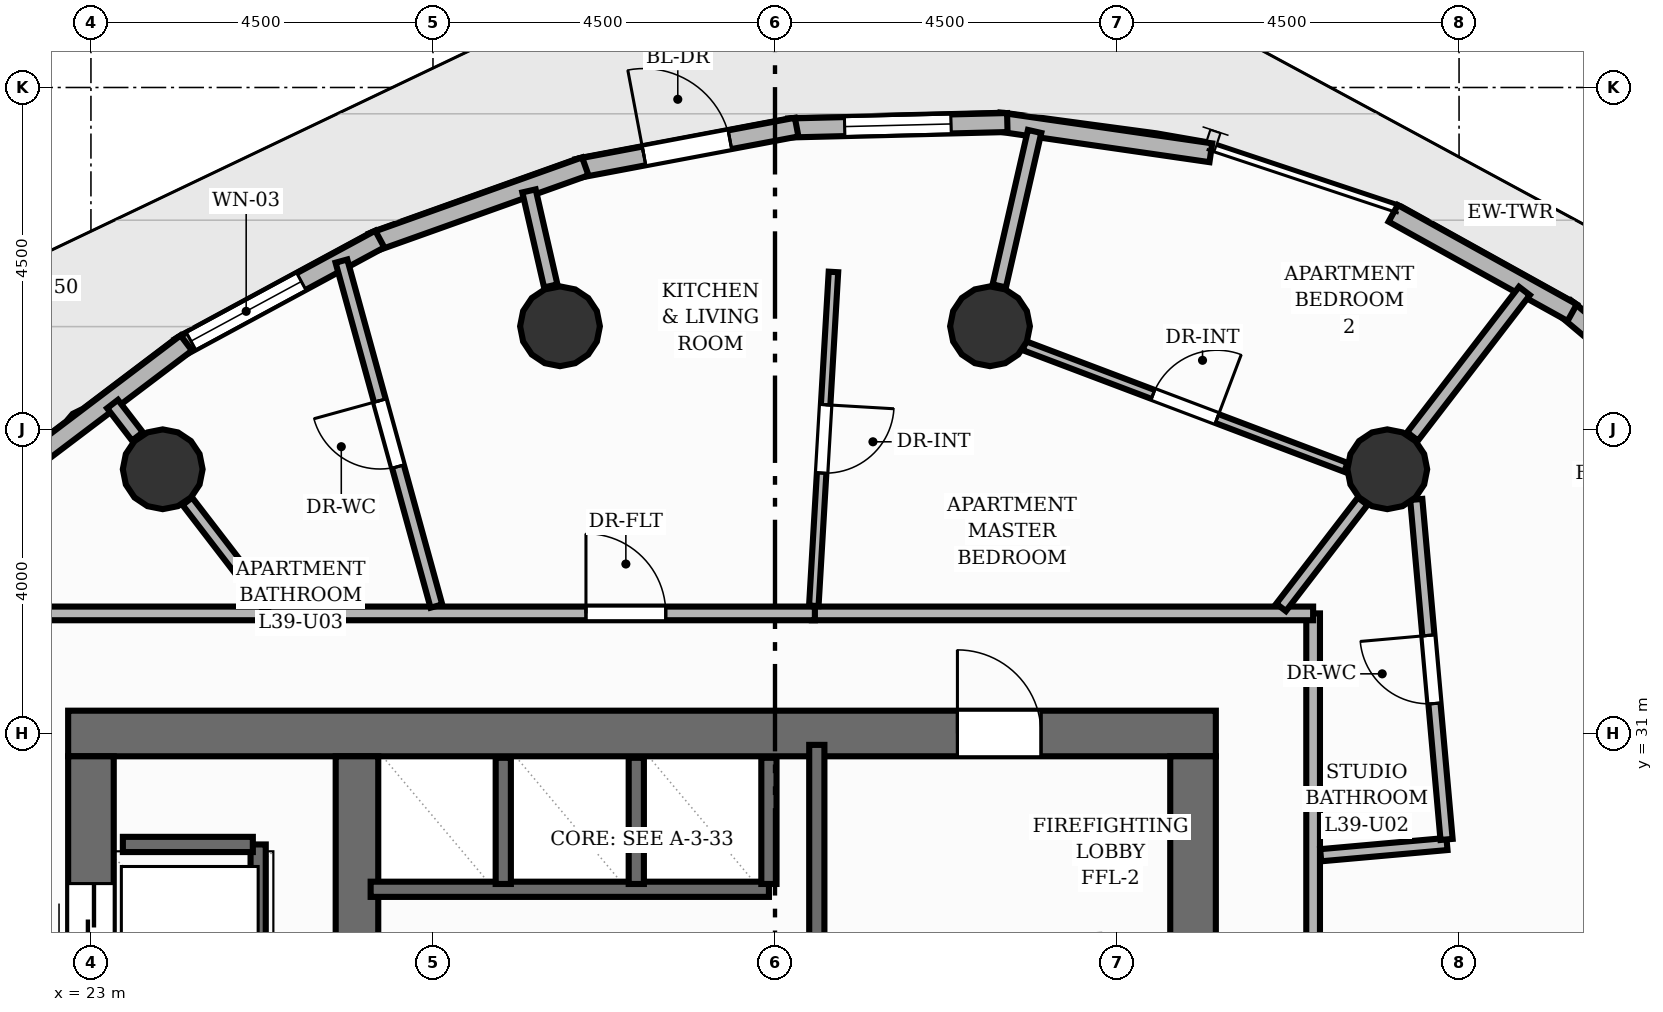
"""IFC4 building model, lengths in metres.
Left out: names, types, materials, properties, quantities, classifications, styles, units other than length and angle.
Written with IfcOpenShell. Run it as: python <this file> out.ifc"""

import sys

from ifc_helpers import new_model, si_unit, direction, frame, frame_2d, origin, origin_2d, place, context, subcontext, project, spatial, rectangle, circle, extrude, element, fill, save


model = new_model("IFC4")
c1 = context("Model", 3, precision=1e-05, world=origin(), true_north=direction((0.0, 1.0)))
c2 = subcontext(c1, "Body", "Model", "MODEL_VIEW")
j1 = project(units=[si_unit("LENGTHUNIT", "METRE"), si_unit("PLANEANGLEUNIT", "RADIAN")], contexts=[c1])
p1 = place(None, origin())
s1 = spatial("IfcSite", under=j1, at=p1, CompositionType="ELEMENT")
p2 = place(p1, origin())
s2 = spatial("IfcBuilding", under=s1, at=p2, CompositionType="ELEMENT")
p3 = place(p2, frame((0.0, 0.0, 132.96)))
s3 = spatial("IfcBuildingStorey", under=s2, at=p3, CompositionType="ELEMENT", Elevation=132.96)
p4 = place(p3, frame((22.7, 31.0, 0.0), z_axis=(0.0, 0.0, 1.0), x_axis=(1.0, 0.0, 0.0)))
e1 = element("IfcWall", 1, at=p4, inside=s3, PredefinedType="SHEAR", context=c2, shape_type="SweptSolid", body=[
    extrude(rectangle(XDim=15.1, YDim=0.6, at=frame_2d((7.55, 0.0))), origin(), (0.0, 0.0, 1.0), 3.2),
])
p5 = place(p4, frame((11.7, 0.0, 0.0)))
e2 = element("IfcOpeningElement", 2, at=p5, cuts=e1, PredefinedType="OPENING", context=c2, shape_type="SweptSolid", body=[
    extrude(rectangle(XDim=1.1, YDim=2.15, at=frame_2d((0.55, 1.075))), frame((0.0, 0.31, 0.0), z_axis=(0.0, -1.0, 0.0), x_axis=(1.0, 0.0, 0.0)), (0.0, 0.0, 1.0), 0.62),
])
p6 = place(p3, frame((23.0, 17.3, 0.0), z_axis=(0.0, 0.0, 1.0), x_axis=(0.0, 1.0, 0.0)))
e3 = element("IfcWall", 3, at=p6, inside=s3, PredefinedType="SHEAR", context=c2, shape_type="SweptSolid", body=[
    extrude(rectangle(XDim=13.4, YDim=0.6, at=frame_2d((6.7, 0.0))), origin(), (0.0, 0.0, 1.0), 3.2),
])
p7 = place(p6, frame((1.675, 0.0, 0.0)))
e4 = element("IfcOpeningElement", 4, at=p7, cuts=e3, PredefinedType="OPENING", context=c2, shape_type="SweptSolid", body=[
    extrude(rectangle(XDim=1.05, YDim=2.15, at=frame_2d((0.525, 1.075))), frame((0.0, 0.31, 0.0), z_axis=(0.0, -1.0, 0.0), x_axis=(1.0, 0.0, 0.0)), (0.0, 0.0, 1.0), 0.62),
])
p8 = place(p6, frame((6.175, 0.0, 0.0)))
e5 = element("IfcOpeningElement", 5, at=p8, cuts=e3, PredefinedType="OPENING", context=c2, shape_type="SweptSolid", body=[
    extrude(rectangle(XDim=1.05, YDim=2.15, at=frame_2d((0.525, 1.075))), frame((0.0, 0.31, 0.0), z_axis=(0.0, -1.0, 0.0), x_axis=(1.0, 0.0, 0.0)), (0.0, 0.0, 1.0), 0.62),
])
p9 = place(p6, frame((10.675, 0.0, 0.0)))
e6 = element("IfcOpeningElement", 6, at=p9, cuts=e3, PredefinedType="OPENING", context=c2, shape_type="SweptSolid", body=[
    extrude(rectangle(XDim=1.05, YDim=2.15, at=frame_2d((0.525, 1.075))), frame((0.0, 0.31, 0.0), z_axis=(0.0, -1.0, 0.0), x_axis=(1.0, 0.0, 0.0)), (0.0, 0.0, 1.0), 0.62),
])
p10 = place(p3, frame((37.5, 17.3, 0.0), z_axis=(0.0, 0.0, 1.0), x_axis=(0.0, 1.0, 0.0)))
e7 = element("IfcWall", 7, at=p10, inside=s3, PredefinedType="SHEAR", context=c2, shape_type="SweptSolid", body=[
    extrude(rectangle(XDim=13.4, YDim=0.6, at=frame_2d((6.7, 0.0))), origin(), (0.0, 0.0, 1.0), 3.2),
])
p11 = place(p3, frame((26.5, 17.3, 0.0), z_axis=(0.0, 0.0, 1.0), x_axis=(0.0, 1.0, 0.0)))
e8 = element("IfcWall", 8, at=p11, inside=s3, PredefinedType="SHEAR", context=c2, shape_type="SweptSolid", body=[
    extrude(rectangle(XDim=13.4, YDim=0.56, at=frame_2d((6.7, 0.0))), origin(), (0.0, 0.0, 1.0), 3.2),
])
for number, where, z_axis, x_axis in (
    (9, (40.056, 34.477, 0.0), (0.0, 0.0, 1.0), (1.0, 0.0, 0.0)),
    (10, (34.829, 36.358, 0.0), (0.0, 0.0, 1.0), (1.0, 0.0, 0.0)),
    (11, (29.171, 36.358, 0.0), (0.0, 0.0, 1.0), (1.0, 0.0, 0.0)),
    (12, (23.944, 34.477, 0.0), (0.0, 0.0, 1.0), (1.0, 0.0, 0.0)),
):
    element("IfcColumn", number, at=place(p3, frame(where, z_axis=z_axis, x_axis=x_axis)), inside=s3, PredefinedType="COLUMN", context=c2, shape_type="SweptSolid", body=[
        extrude(circle(Radius=0.525, at=origin_2d()), origin(), (0.0, 0.0, 1.0), 3.2),
    ])
p12 = place(p3, frame((42.395, 36.601, 0.0), z_axis=(0.0, 0.0, 1.0), x_axis=(0.764825125467, -0.644237943197, 0.0)))
e13 = element("IfcWall", 13, at=p12, inside=s3, PredefinedType="SOLIDWALL", context=c2, shape_type="SweptSolid", body=[
    extrude(rectangle(XDim=2.648, YDim=0.25, at=frame_2d((1.324, 0.0))), origin(), (0.0, 0.0, 1.0), 2.96),
])
p13 = place(p12, frame((0.624, 0.0, 0.85)))
e14 = element("IfcOpeningElement", 14, at=p13, cuts=e13, PredefinedType="OPENING", context=c2, shape_type="SweptSolid", body=[
    extrude(rectangle(XDim=1.4, YDim=1.55, at=frame_2d((0.7, 0.775))), frame((0.0, 0.135, 0.0), z_axis=(0.0, -1.0, 0.0), x_axis=(1.0, 0.0, 0.0)), (0.0, 0.0, 1.0), 0.27),
])
p14 = place(p3, frame((40.134, 37.844, 0.0), z_axis=(0.0, 0.0, 1.0), x_axis=(0.874341102682, -0.485311895755, 0.0)))
e15 = element("IfcWall", 15, at=p14, inside=s3, PredefinedType="SOLIDWALL", context=c2, shape_type="SweptSolid", body=[
    extrude(rectangle(XDim=2.693, YDim=0.25, at=frame_2d((1.346, 0.0))), origin(), (0.0, 0.0, 1.0), 2.96),
])
p15 = place(p3, frame((34.946, 39.045, 0.0), z_axis=(0.0, 0.0, 1.0), x_axis=(0.98966505468, -0.143398324768, 0.0)))
e16 = element("IfcWall", 16, at=p15, inside=s3, PredefinedType="SOLIDWALL", context=c2, shape_type="SweptSolid", body=[
    extrude(rectangle(XDim=2.818, YDim=0.25, at=frame_2d((1.409, 0.0))), origin(), (0.0, 0.0, 1.0), 2.96),
])
p16 = place(p3, frame((32.176, 38.967, 0.0), z_axis=(0.0, 0.0, 1.0), x_axis=(0.999687646408, 0.02499219116, 0.0)))
e17 = element("IfcWall", 17, at=p16, inside=s3, PredefinedType="SOLIDWALL", context=c2, shape_type="SweptSolid", body=[
    extrude(rectangle(XDim=2.882, YDim=0.25, at=frame_2d((1.441, 0.0))), origin(), (0.0, 0.0, 1.0), 2.96),
])
p17 = place(p16, frame((0.741, 0.0, 0.85)))
e18 = element("IfcOpeningElement", 18, at=p17, cuts=e17, PredefinedType="OPENING", context=c2, shape_type="SweptSolid", body=[
    extrude(rectangle(XDim=1.4, YDim=1.55, at=frame_2d((0.7, 0.775))), frame((0.0, 0.135, 0.0), z_axis=(0.0, -1.0, 0.0), x_axis=(1.0, 0.0, 0.0)), (0.0, 0.0, 1.0), 0.27),
])
p18 = place(p3, frame((29.399, 38.434, 0.0), z_axis=(0.0, 0.0, 1.0), x_axis=(0.982637070109, 0.185538105108, 0.0)))
e19 = element("IfcWall", 19, at=p18, inside=s3, PredefinedType="SOLIDWALL", context=c2, shape_type="SweptSolid", body=[
    extrude(rectangle(XDim=2.937, YDim=0.25, at=frame_2d((1.469, 0.0))), origin(), (0.0, 0.0, 1.0), 2.96),
])
p19 = place(p18, frame((0.893, 0.0, 0.0)))
e20 = element("IfcOpeningElement", 20, at=p19, cuts=e19, PredefinedType="OPENING", context=c2, shape_type="SweptSolid", body=[
    extrude(rectangle(XDim=1.15, YDim=2.2, at=frame_2d((0.575, 1.1))), frame((0.0, 0.135, 0.0), z_axis=(0.0, -1.0, 0.0), x_axis=(1.0, 0.0, 0.0)), (0.0, 0.0, 1.0), 0.27),
])
p20 = place(p3, frame((26.701, 37.461, 0.0), z_axis=(0.0, 0.0, 1.0), x_axis=(0.94175304307, 0.33630522724, 0.0)))
e21 = element("IfcWall", 21, at=p20, inside=s3, PredefinedType="SOLIDWALL", context=c2, shape_type="SweptSolid", body=[
    extrude(rectangle(XDim=2.977, YDim=0.25, at=frame_2d((1.489, 0.0))), origin(), (0.0, 0.0, 1.0), 2.96),
])
p21 = place(p3, frame((24.163, 36.079, 0.0), z_axis=(0.0, 0.0, 1.0), x_axis=(0.879567466611, 0.475774181393, 0.0)))
e22 = element("IfcWall", 22, at=p21, inside=s3, PredefinedType="SOLIDWALL", context=c2, shape_type="SweptSolid", body=[
    extrude(rectangle(XDim=2.998, YDim=0.25, at=frame_2d((1.499, 0.0))), origin(), (0.0, 0.0, 1.0), 2.96),
])
p22 = place(p21, frame((0.175, 0.0, 0.85)))
e23 = element("IfcOpeningElement", 23, at=p22, cuts=e22, PredefinedType="OPENING", context=c2, shape_type="SweptSolid", body=[
    extrude(rectangle(XDim=1.65, YDim=1.55, at=frame_2d((0.825, 0.775))), frame((0.0, 0.135, 0.0), z_axis=(0.0, -1.0, 0.0), x_axis=(1.0, 0.0, 0.0)), (0.0, 0.0, 1.0), 0.27),
])
p23 = place(p3, frame((21.863, 34.329, 0.0), z_axis=(0.0, 0.0, 1.0), x_axis=(0.797511213298, 0.603304122863, 0.0)))
e24 = element("IfcWall", 24, at=p23, inside=s3, PredefinedType="SOLIDWALL", context=c2, shape_type="SweptSolid", body=[
    extrude(rectangle(XDim=2.998, YDim=0.25, at=frame_2d((1.499, 0.0))), origin(), (0.0, 0.0, 1.0), 2.96),
])
p24 = place(p3, frame((32.55, 27.35, 0.0), z_axis=(0.0, 0.0, 1.0), x_axis=(0.0, 1.0, 0.0)))
e25 = element("IfcWall", 25, at=p24, inside=s3, PredefinedType="SHEAR", context=c2, shape_type="SweptSolid", body=[
    extrude(rectangle(XDim=3.5, YDim=0.2, at=frame_2d((1.75, 0.0))), origin(), (0.0, 0.0, 1.0), 3.2),
])
p25 = place(p3, frame((25.2, 18.46, 0.0), z_axis=(0.0, 0.0, 1.0), x_axis=(0.0, 1.0, 0.0)))
e26 = element("IfcWall", 26, at=p25, inside=s3, PredefinedType="SHEAR", context=c2, shape_type="SweptSolid", body=[
    extrude(rectangle(XDim=11.08, YDim=0.2, at=frame_2d((5.54, 0.0))), origin(), (0.0, 0.0, 1.0), 3.2),
])
p26 = place(p3, frame((23.42, 29.54, 0.0), z_axis=(0.0, 0.0, 1.0), x_axis=(1.0, 0.0, 0.0)))
e27 = element("IfcWall", 27, at=p26, inside=s3, PredefinedType="SHEAR", context=c2, shape_type="SweptSolid", body=[
    extrude(rectangle(XDim=1.71, YDim=0.2, at=frame_2d((0.855, 0.0))), origin(), (0.0, 0.0, 1.0), 3.2),
])
p27 = place(p3, frame((26.68, 28.95, 0.0), z_axis=(0.0, 0.0, 1.0), x_axis=(1.0, 0.0, 0.0)))
e28 = element("IfcWall", 28, at=p27, inside=s3, PredefinedType="SHEAR", context=c2, shape_type="SweptSolid", body=[
    extrude(rectangle(XDim=5.24, YDim=0.2, at=frame_2d((2.62, 0.0))), origin(), (0.0, 0.0, 1.0), 3.2),
])
for number, where, z_axis, x_axis in (
    (29, (31.92, 29.02, 0.0), (0.0, 0.0, 1.0), (0.0, 1.0, 0.0)),
    (30, (28.425, 29.02, 0.0), (0.0, 0.0, 1.0), (0.0, 1.0, 0.0)),
    (31, (30.175, 29.02, 0.0), (0.0, 0.0, 1.0), (0.0, 1.0, 0.0)),
):
    element("IfcWall", number, at=place(p3, frame(where, z_axis=z_axis, x_axis=x_axis)), inside=s3, PredefinedType="SHEAR", context=c2, shape_type="SweptSolid", body=[
        extrude(rectangle(XDim=1.66, YDim=0.2, at=frame_2d((0.83, 0.0))), origin(), (0.0, 0.0, 1.0), 3.2),
    ])
p28 = place(p3, frame((40.388, 34.908, 0.0), z_axis=(0.0, 0.0, 1.0), x_axis=(0.609549509747, 0.79274800231, 0.0)))
e32 = element("IfcWall", 32, at=p28, inside=s3, PredefinedType="PARTITIONING", context=c2, shape_type="SweptSolid", body=[
    extrude(rectangle(XDim=2.415, YDim=0.18, at=frame_2d((1.208, 0.0))), origin(), (0.0, 0.0, 1.0), 2.336),
])
p29 = place(p3, frame((34.95, 36.889, 0.0), z_axis=(0.0, 0.0, 1.0), x_axis=(0.223063251486, 0.974803973031, 0.0)))
e33 = element("IfcWall", 33, at=p29, inside=s3, PredefinedType="PARTITIONING", context=c2, shape_type="SweptSolid", body=[
    extrude(rectangle(XDim=2.085, YDim=0.18, at=frame_2d((1.042, 0.0))), origin(), (0.0, 0.0, 1.0), 2.336),
])
p30 = place(p3, frame((29.05, 36.889, 0.0), z_axis=(0.0, 0.0, 1.0), x_axis=(-0.223093561241, 0.974797036789, 0.0)))
e34 = element("IfcWall", 34, at=p30, inside=s3, PredefinedType="PARTITIONING", context=c2, shape_type="SweptSolid", body=[
    extrude(rectangle(XDim=1.282, YDim=0.18, at=frame_2d((0.641, 0.0))), origin(), (0.0, 0.0, 1.0), 2.336),
])
p31 = place(p3, frame((23.612, 34.908, 0.0), z_axis=(0.0, 0.0, 1.0), x_axis=(-0.609469486836, 0.792809526063, 0.0)))
e35 = element("IfcWall", 35, at=p31, inside=s3, PredefinedType="PARTITIONING", context=c2, shape_type="SweptSolid", body=[
    extrude(rectangle(XDim=0.538, YDim=0.18, at=frame_2d((0.269, 0.0))), origin(), (0.0, 0.0, 1.0), 2.336),
])
p32 = place(p3, frame((39.08, 32.58, 0.0), z_axis=(0.0, 0.0, 1.0), x_axis=(0.0, -1.0, 0.0)))
e36 = element("IfcWall", 36, at=p32, inside=s3, PredefinedType="PARTITIONING", context=c2, shape_type="SweptSolid", body=[
    extrude(rectangle(XDim=17.16, YDim=0.18, at=frame_2d((8.58, 0.0))), origin(), (0.0, 0.0, 1.0), 2.955),
])
p33 = place(p32, frame((9.64, 0.0, 0.0)))
e37 = element("IfcOpeningElement", 37, at=p33, cuts=e36, PredefinedType="OPENING", context=c2, shape_type="SweptSolid", body=[
    extrude(rectangle(XDim=1.05, YDim=2.15, at=frame_2d((0.525, 1.075))), frame((0.0, 0.1, 0.0), z_axis=(0.0, -1.0, 0.0), x_axis=(1.0, 0.0, 0.0)), (0.0, 0.0, 1.0), 0.2),
])
p34 = place(p3, frame((32.485, 32.58, 0.0), z_axis=(0.0, 0.0, 1.0), x_axis=(1.0, 0.0, 0.0)))
e38 = element("IfcWall", 38, at=p34, inside=s3, PredefinedType="PARTITIONING", context=c2, shape_type="SweptSolid", body=[
    extrude(rectangle(XDim=6.595, YDim=0.18, at=frame_2d((3.298, 0.0))), origin(), (0.0, 0.0, 1.0), 2.955),
])
p35 = place(p3, frame((21.42, 32.58, 0.0), z_axis=(0.0, 0.0, 1.0), x_axis=(1.0, 0.0, 0.0)))
e39 = element("IfcWall", 39, at=p35, inside=s3, PredefinedType="PARTITIONING", context=c2, shape_type="SweptSolid", body=[
    extrude(rectangle(XDim=11.105, YDim=0.18, at=frame_2d((5.552, 0.0))), origin(), (0.0, 0.0, 1.0), 2.955),
])
p36 = place(p35, frame((8.093, 0.0, 0.0)))
e40 = element("IfcOpeningElement", 40, at=p36, cuts=e39, PredefinedType="OPENING", context=c2, shape_type="SweptSolid", body=[
    extrude(rectangle(XDim=1.05, YDim=2.15, at=frame_2d((0.525, 1.075))), frame((0.0, 0.1, 0.0), z_axis=(0.0, -1.0, 0.0), x_axis=(1.0, 0.0, 0.0)), (0.0, 0.0, 1.0), 0.2),
])
p37 = place(p3, frame((39.18, 29.398, 0.0), z_axis=(0.0, 0.0, 1.0), x_axis=(0.996058284503, 0.088701149215, 0.0)))
e41 = element("IfcWall", 41, at=p37, inside=s3, PredefinedType="PLUMBINGWALL", context=c2, shape_type="SweptSolid", body=[
    extrude(rectangle(XDim=1.668, YDim=0.16, at=frame_2d((0.834, 0.0))), origin(), (0.0, 0.0, 1.0), 2.955),
])
p38 = place(p3, frame((40.836, 29.606, 0.0), z_axis=(0.0, 0.0, 1.0), x_axis=(-0.08877110741, 0.996052052098, 0.0)))
e42 = element("IfcWall", 42, at=p38, inside=s3, PredefinedType="PLUMBINGWALL", context=c2, shape_type="SweptSolid", body=[
    extrude(rectangle(XDim=4.491, YDim=0.16, at=frame_2d((2.246, 0.0))), origin(), (0.0, 0.0, 1.0), 2.955),
])
p39 = place(p38, frame((1.796, 0.0, 0.0)))
e43 = element("IfcOpeningElement", 43, at=p39, cuts=e42, PredefinedType="OPENING", context=c2, shape_type="SweptSolid", body=[
    extrude(rectangle(XDim=0.9, YDim=2.1, at=frame_2d((0.45, 1.05))), frame((0.0, 0.09, 0.0), z_axis=(0.0, -1.0, 0.0), x_axis=(1.0, 0.0, 0.0)), (0.0, 0.0, 1.0), 0.18),
])
p40 = place(p3, frame((38.658, 32.659, 0.0), z_axis=(0.0, 0.0, 1.0), x_axis=(0.609536601946, 0.792757927042, 0.0)))
e44 = element("IfcWall", 44, at=p40, inside=s3, PredefinedType="PLUMBINGWALL", context=c2, shape_type="SweptSolid", body=[
    extrude(rectangle(XDim=1.761, YDim=0.16, at=frame_2d((0.881, 0.0))), origin(), (0.0, 0.0, 1.0), 2.336),
])
p41 = place(p3, frame((27.545, 32.677, 0.0), z_axis=(0.0, 0.0, 1.0), x_axis=(-0.265393905211, 0.964140070258, 0.0)))
e45 = element("IfcWall", 45, at=p41, inside=s3, PredefinedType="PLUMBINGWALL", context=c2, shape_type="SweptSolid", body=[
    extrude(rectangle(XDim=4.708, YDim=0.16, at=frame_2d((2.354, 0.0))), origin(), (0.0, 0.0, 1.0), 2.955),
])
p42 = place(p41, frame((1.904, 0.0, 0.0)))
e46 = element("IfcOpeningElement", 46, at=p42, cuts=e45, PredefinedType="OPENING", context=c2, shape_type="SweptSolid", body=[
    extrude(rectangle(XDim=0.9, YDim=2.1, at=frame_2d((0.45, 1.05))), frame((0.0, 0.09, 0.0), z_axis=(0.0, -1.0, 0.0), x_axis=(1.0, 0.0, 0.0)), (0.0, 0.0, 1.0), 0.18),
])
p43 = place(p3, frame((32.769, 37.073, 0.0), z_axis=(0.0, 0.0, 1.0), x_axis=(-0.058751291398, -0.998272651012, 0.0)))
e47 = element("IfcWall", 47, at=p43, inside=s3, PredefinedType="PARTITIONING", context=c2, shape_type="SweptSolid", body=[
    extrude(rectangle(XDim=4.401, YDim=0.125, at=frame_2d((2.2, 0.0))), origin(), (0.0, 0.0, 1.0), 2.692),
])
p44 = place(p43, frame((1.75, 0.0, 0.0)))
e48 = element("IfcOpeningElement", 48, at=p44, cuts=e47, PredefinedType="OPENING", context=c2, shape_type="SweptSolid", body=[
    extrude(rectangle(XDim=0.9, YDim=2.1, at=frame_2d((0.45, 1.05))), frame((0.0, 0.073, 0.0), z_axis=(0.0, -1.0, 0.0), x_axis=(1.0, 0.0, 0.0)), (0.0, 0.0, 1.0), 0.145),
])
p45 = place(p3, frame((25.342, 32.659, 0.0), z_axis=(0.0, 0.0, 1.0), x_axis=(-0.609536601946, 0.792757927042, 0.0)))
e49 = element("IfcWall", 49, at=p45, inside=s3, PredefinedType="PLUMBINGWALL", context=c2, shape_type="SweptSolid", body=[
    extrude(rectangle(XDim=1.761, YDim=0.16, at=frame_2d((0.881, 0.0))), origin(), (0.0, 0.0, 1.0), 2.336),
])
p46 = place(p3, frame((35.278, 36.103, 0.0), z_axis=(0.0, 0.0, 1.0), x_axis=(0.935309901838, -0.353829602385, 0.0)))
e50 = element("IfcWall", 50, at=p46, inside=s3, PredefinedType="PARTITIONING", context=c2, shape_type="SweptSolid", body=[
    extrude(rectangle(XDim=4.526, YDim=0.125, at=frame_2d((2.263, 0.0))), origin(), (0.0, 0.0, 1.0), 2.411),
])
p47 = place(p46, frame((1.813, 0.0, 0.0)))
e51 = element("IfcOpeningElement", 51, at=p47, cuts=e50, PredefinedType="OPENING", context=c2, shape_type="SweptSolid", body=[
    extrude(rectangle(XDim=0.9, YDim=2.1, at=frame_2d((0.45, 1.05))), frame((0.0, 0.073, 0.0), z_axis=(0.0, -1.0, 0.0), x_axis=(1.0, 0.0, 0.0)), (0.0, 0.0, 1.0), 0.145),
])
p48 = place(p19, origin())
e52 = element("IfcDoor", 52, at=p48, inside=s3, OperationType="SINGLE_SWING_LEFT", PredefinedType="DOOR", context=c2, shape_type="SweptSolid", body=[
    extrude(rectangle(XDim=1.15, YDim=2.2, at=frame_2d((0.575, 1.1))), frame((0.0, 0.025, 0.0), z_axis=(0.0, -1.0, 0.0), x_axis=(1.0, 0.0, 0.0)), (0.0, 0.0, 1.0), 0.05),
])
fill(e20, e52)
p49 = place(p17, origin())
e53 = element("IfcWindow", 53, at=p49, inside=s3, PartitioningType="SINGLE_PANEL", PredefinedType="WINDOW", context=c2, shape_type="SweptSolid", body=[
    extrude(rectangle(XDim=1.4, YDim=1.55, at=frame_2d((0.7, 0.775))), frame((0.0, 0.03, 0.0), z_axis=(0.0, -1.0, 0.0), x_axis=(1.0, 0.0, 0.0)), (0.0, 0.0, 1.0), 0.06),
])
fill(e18, e53)
p50 = place(p22, origin())
e54 = element("IfcWindow", 54, at=p50, inside=s3, PartitioningType="SINGLE_PANEL", PredefinedType="WINDOW", context=c2, shape_type="SweptSolid", body=[
    extrude(rectangle(XDim=1.65, YDim=1.55, at=frame_2d((0.825, 0.775))), frame((0.0, 0.03, 0.0), z_axis=(0.0, -1.0, 0.0), x_axis=(1.0, 0.0, 0.0)), (0.0, 0.0, 1.0), 0.06),
])
fill(e23, e54)
p51 = place(p5, origin())
e55 = element("IfcDoor", 55, at=p51, inside=s3, OperationType="SINGLE_SWING_LEFT", PredefinedType="DOOR", context=c2, shape_type="SweptSolid", body=[
    extrude(rectangle(XDim=1.1, YDim=2.15, at=frame_2d((0.55, 1.075))), frame((0.0, 0.025, 0.0), z_axis=(0.0, -1.0, 0.0), x_axis=(1.0, 0.0, 0.0)), (0.0, 0.0, 1.0), 0.05),
])
fill(e2, e55)
p52 = place(p9, origin())
e56 = element("IfcDoor", 56, at=p52, inside=s3, OperationType="DOUBLE_DOOR_SLIDING", PredefinedType="DOOR", context=c2, shape_type="SweptSolid", body=[
    extrude(rectangle(XDim=1.05, YDim=2.15, at=frame_2d((0.525, 1.075))), frame((0.0, 0.025, 0.0), z_axis=(0.0, -1.0, 0.0), x_axis=(1.0, 0.0, 0.0)), (0.0, 0.0, 1.0), 0.05),
])
fill(e6, e56)
p53 = place(p39, origin())
e57 = element("IfcDoor", 57, at=p53, inside=s3, OperationType="SINGLE_SWING_RIGHT", PredefinedType="DOOR", context=c2, shape_type="SweptSolid", body=[
    extrude(rectangle(XDim=0.9, YDim=2.1, at=frame_2d((0.45, 1.05))), frame((0.0, 0.025, 0.0), z_axis=(0.0, -1.0, 0.0), x_axis=(1.0, 0.0, 0.0)), (0.0, 0.0, 1.0), 0.05),
])
fill(e43, e57)
p54 = place(p36, origin())
e58 = element("IfcDoor", 58, at=p54, inside=s3, OperationType="SINGLE_SWING_LEFT", PredefinedType="DOOR", context=c2, shape_type="SweptSolid", body=[
    extrude(rectangle(XDim=1.05, YDim=2.15, at=frame_2d((0.525, 1.075))), frame((0.0, 0.025, 0.0), z_axis=(0.0, -1.0, 0.0), x_axis=(1.0, 0.0, 0.0)), (0.0, 0.0, 1.0), 0.05),
])
fill(e40, e58)
p55 = place(p42, origin())
e59 = element("IfcDoor", 59, at=p55, inside=s3, OperationType="SINGLE_SWING_RIGHT", PredefinedType="DOOR", context=c2, shape_type="SweptSolid", body=[
    extrude(rectangle(XDim=0.9, YDim=2.1, at=frame_2d((0.45, 1.05))), frame((0.0, 0.025, 0.0), z_axis=(0.0, -1.0, 0.0), x_axis=(1.0, 0.0, 0.0)), (0.0, 0.0, 1.0), 0.05),
])
fill(e46, e59)
p56 = place(p44, origin())
e60 = element("IfcDoor", 60, at=p56, inside=s3, OperationType="SINGLE_SWING_LEFT", PredefinedType="DOOR", context=c2, shape_type="SweptSolid", body=[
    extrude(rectangle(XDim=0.9, YDim=2.1, at=frame_2d((0.45, 1.05))), frame((0.0, 0.025, 0.0), z_axis=(0.0, -1.0, 0.0), x_axis=(1.0, 0.0, 0.0)), (0.0, 0.0, 1.0), 0.05),
])
fill(e48, e60)
p57 = place(p47, origin())
e61 = element("IfcDoor", 61, at=p57, inside=s3, OperationType="SINGLE_SWING_RIGHT", PredefinedType="DOOR", context=c2, shape_type="SweptSolid", body=[
    extrude(rectangle(XDim=0.9, YDim=2.1, at=frame_2d((0.45, 1.05))), frame((0.0, 0.025, 0.0), z_axis=(0.0, -1.0, 0.0), x_axis=(1.0, 0.0, 0.0)), (0.0, 0.0, 1.0), 0.05),
])
fill(e51, e61)
save(model, sys.argv[1])
